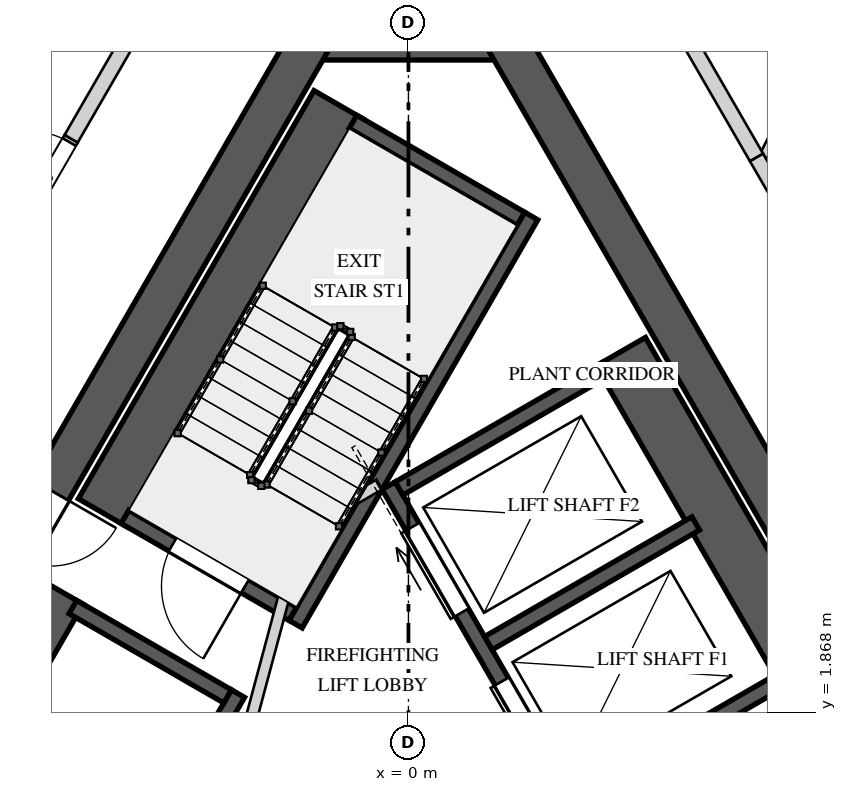
"""IFC4 building model, lengths in metres.
Left out: names, types, materials, properties, quantities, classifications, styles, units other than length and angle.
Written with IfcOpenShell. Run it as: python <this file> out.ifc"""

import sys

from ifc_helpers import new_model, si_unit, direction, frame, frame_2d, origin, place, context, subcontext, project, spatial, polyline, rectangle, outline, extrude, element, fill, save


model = new_model("IFC4")
c1 = context("Model", 3, precision=1e-05, world=origin(), true_north=direction((0.0, 1.0)))
c2 = subcontext(c1, "Body", "Model", "MODEL_VIEW")
j1 = project(units=[si_unit("LENGTHUNIT", "METRE"), si_unit("PLANEANGLEUNIT", "RADIAN")], contexts=[c1])
p1 = place(None, origin())
s1 = spatial("IfcSite", under=j1, at=p1, CompositionType="ELEMENT")
p2 = place(p1, origin())
s2 = spatial("IfcBuilding", under=s1, at=p2, CompositionType="ELEMENT")
p3 = place(p2, frame((0.0, 0.0, 374.9)))
s3 = spatial("IfcBuildingStorey", under=s2, at=p3, CompositionType="ELEMENT", Elevation=374.9)
p4 = place(p3, frame((1.443, 10.725, 0.0), z_axis=(0.0, 0.0, 1.0), x_axis=(-1.0, 0.0, 0.0)))
e1 = element("IfcWall", 1, at=p4, inside=s3, PredefinedType="SHEAR", context=c2, shape_type="SweptSolid", body=[
    extrude(rectangle(XDim=2.887, YDim=0.55, at=frame_2d((1.443, 0.0))), origin(), (0.0, 0.0, 1.0), 6.0),
])
p5 = place(p3, frame((-1.285, 10.725, 0.0), z_axis=(0.0, 0.0, 1.0), x_axis=(-0.499994590896, -0.86602852671, 0.0)))
e2 = element("IfcWall", 2, at=p5, inside=s3, PredefinedType="SHEAR", context=c2, shape_type="SweptSolid", body=[
    extrude(rectangle(XDim=17.292, YDim=0.55, at=frame_2d((8.646, 0.0))), origin(), (0.0, 0.0, 1.0), 6.0),
])
p6 = place(p5, frame((6.851, 0.0, 0.0)))
e3 = element("IfcOpeningElement", 3, at=p6, cuts=e2, PredefinedType="OPENING", context=c2, shape_type="SweptSolid", body=[
    extrude(rectangle(XDim=1.0, YDim=2.4, at=frame_2d((0.5, 1.2))), frame((0.0, 0.285, 0.0), z_axis=(0.0, -1.0, 0.0), x_axis=(1.0, 0.0, 0.0)), (0.0, 0.0, 1.0), 0.57),
])
p7 = place(p5, frame((15.089, 0.0, 0.0)))
e4 = element("IfcOpeningElement", 4, at=p7, cuts=e2, PredefinedType="OPENING", context=c2, shape_type="SweptSolid", body=[
    extrude(rectangle(XDim=0.8, YDim=2.1, at=frame_2d((0.4, 1.05))), frame((0.0, 0.285, 0.0), z_axis=(0.0, -1.0, 0.0), x_axis=(1.0, 0.0, 0.0)), (0.0, 0.0, 1.0), 0.57),
])
p8 = place(p3, frame((9.93, -4.25, 0.0), z_axis=(0.0, 0.0, 1.0), x_axis=(-0.499994590896, 0.86602852671, 0.0)))
e5 = element("IfcWall", 5, at=p8, inside=s3, PredefinedType="SHEAR", context=c2, shape_type="SweptSolid", body=[
    extrude(rectangle(XDim=17.292, YDim=0.55, at=frame_2d((8.646, 0.0))), origin(), (0.0, 0.0, 1.0), 6.0),
])
p9 = place(p8, frame((6.921, 0.0, 0.0)))
e6 = element("IfcOpeningElement", 6, at=p9, cuts=e5, PredefinedType="OPENING", context=c2, shape_type="SweptSolid", body=[
    extrude(rectangle(XDim=1.0, YDim=2.4, at=frame_2d((0.5, 1.2))), frame((0.0, 0.285, 0.0), z_axis=(0.0, -1.0, 0.0), x_axis=(1.0, 0.0, 0.0)), (0.0, 0.0, 1.0), 0.57),
])
p10 = place(p3, frame((-0.918, 9.86, 0.0), z_axis=(0.0, 0.0, 1.0), x_axis=(-0.500026960575, -0.86600983753, 0.0)))
e7 = element("IfcWall", 7, at=p10, inside=s3, PredefinedType="SOLIDWALL", context=c2, shape_type="SweptSolid", body=[
    extrude(rectangle(XDim=6.2, YDim=0.75, at=frame_2d((3.1, 0.0))), origin(), (0.0, 0.0, 1.0), 5.65),
])
p11 = place(p3, frame((1.615, 8.397, 0.0), z_axis=(0.0, 0.0, 1.0), x_axis=(-0.500009909098, -0.866019682689, 0.0)))
e8 = element("IfcWall", 8, at=p11, inside=s3, PredefinedType="SOLIDWALL", context=c2, shape_type="SweptSolid", body=[
    extrude(rectangle(XDim=6.2, YDim=0.2, at=frame_2d((3.1, 0.0))), origin(), (0.0, 0.0, 1.0), 5.65),
])
p12 = place(p3, frame((1.479, 8.361, 0.0), z_axis=(0.0, 0.0, 1.0), x_axis=(-0.865989465428, 0.500062241894, 0.0)))
e9 = element("IfcWall", 9, at=p12, inside=s3, PredefinedType="SOLIDWALL", context=c2, shape_type="SweptSolid", body=[
    extrude(rectangle(XDim=2.55, YDim=0.2, at=frame_2d((1.275, 0.0))), origin(), (0.0, 0.0, 1.0), 5.65),
])
p13 = place(p3, frame((-1.521, 3.165, 0.0), z_axis=(0.0, 0.0, 1.0), x_axis=(-0.866030925526, 0.499990435942, 0.0)))
e10 = element("IfcWall", 10, at=p13, inside=s3, PredefinedType="SOLIDWALL", context=c2, shape_type="SweptSolid", body=[
    extrude(rectangle(XDim=2.55, YDim=0.2, at=frame_2d((1.275, 0.0))), origin(), (0.0, 0.0, 1.0), 5.65),
])
p14 = place(p13, frame((0.725, 0.0, 0.0)))
e11 = element("IfcOpeningElement", 11, at=p14, cuts=e10, PredefinedType="OPENING", context=c2, shape_type="SweptSolid", body=[
    extrude(rectangle(XDim=1.1, YDim=2.4, at=frame_2d((0.55, 1.2))), frame((0.0, 0.11, 0.0), z_axis=(0.0, -1.0, 0.0), x_axis=(1.0, 0.0, 0.0)), (0.0, 0.0, 1.0), 0.22),
])
p15 = place(p3, frame((-4.993, -2.648, 0.0), z_axis=(0.0, 0.0, 1.0), x_axis=(0.499996545922, 0.866027397988, 0.0)))
e12 = element("IfcWall", 12, at=p15, inside=s3, PredefinedType="SOLIDWALL", context=c2, shape_type="SweptSolid", body=[
    extrude(rectangle(XDim=5.5, YDim=0.2, at=frame_2d((2.75, 0.0))), origin(), (0.0, 0.0, 1.0), 5.65),
])
p16 = place(p15, frame((2.275, 0.0, 0.0)))
e13 = element("IfcOpeningElement", 13, at=p16, cuts=e12, PredefinedType="OPENING", context=c2, shape_type="SweptSolid", body=[
    extrude(rectangle(XDim=0.95, YDim=2.4, at=frame_2d((0.475, 1.2))), frame((0.0, 0.11, 0.0), z_axis=(0.0, -1.0, 0.0), x_axis=(1.0, 0.0, 0.0)), (0.0, 0.0, 1.0), 0.22),
])
p17 = place(p3, frame((-4.603, 3.477, 0.0), z_axis=(0.0, 0.0, 1.0), x_axis=(-0.500015767406, -0.866016300277, 0.0)))
e14 = element("IfcWall", 14, at=p17, inside=s3, PredefinedType="SOLIDWALL", context=c2, shape_type="SweptSolid", body=[
    extrude(rectangle(XDim=5.5, YDim=0.75, at=frame_2d((2.75, 0.0))), origin(), (0.0, 0.0, 1.0), 5.65),
])
p18 = place(p3, frame((-2.38, 2.078, 0.0), z_axis=(0.0, 0.0, 1.0), x_axis=(-0.866061024631, 0.499938297808, 0.0)))
e15 = element("IfcWall", 15, at=p18, inside=s3, PredefinedType="SOLIDWALL", context=c2, shape_type="SweptSolid", body=[
    extrude(rectangle(XDim=2.35, YDim=0.2, at=frame_2d((1.175, 0.0))), origin(), (0.0, 0.0, 1.0), 5.65),
])
p19 = place(p3, frame((2.19, 0.606, 0.0), z_axis=(0.0, 0.0, 1.0), x_axis=(-0.500002801628, 0.866023786258, 0.0)))
e16 = element("IfcWall", 16, at=p19, inside=s3, PredefinedType="SOLIDWALL", context=c2, shape_type="SweptSolid", body=[
    extrude(rectangle(XDim=4.9, YDim=0.2, at=frame_2d((2.45, 0.0))), origin(), (0.0, 0.0, 1.0), 5.65),
])
p20 = place(p19, frame((0.625, 0.0, 0.0)))
e17 = element("IfcOpeningElement", 17, at=p20, cuts=e16, PredefinedType="OPENING", context=c2, shape_type="SweptSolid", body=[
    extrude(rectangle(XDim=1.3, YDim=2.1, at=frame_2d((0.65, 1.05))), frame((0.0, 0.11, 0.0), z_axis=(0.0, -1.0, 0.0), x_axis=(1.0, 0.0, 0.0)), (0.0, 0.0, 1.0), 0.22),
])
p21 = place(p19, frame((2.975, 0.0, 0.0)))
e18 = element("IfcOpeningElement", 18, at=p21, cuts=e16, PredefinedType="OPENING", context=c2, shape_type="SweptSolid", body=[
    extrude(rectangle(XDim=1.3, YDim=2.1, at=frame_2d((0.65, 1.05))), frame((0.0, 0.11, 0.0), z_axis=(0.0, -1.0, 0.0), x_axis=(1.0, 0.0, 0.0)), (0.0, 0.0, 1.0), 0.22),
])
p22 = place(p3, frame((5.243, 2.369, 0.0), z_axis=(0.0, 0.0, 1.0), x_axis=(-0.500002801628, 0.866023786258, 0.0)))
e19 = element("IfcWall", 19, at=p22, inside=s3, PredefinedType="SOLIDWALL", context=c2, shape_type="SweptSolid", body=[
    extrude(rectangle(XDim=4.9, YDim=0.75, at=frame_2d((2.45, 0.0))), origin(), (0.0, 0.0, 1.0), 5.65),
])
for number, where, z_axis, x_axis in (
    (20, (2.227, 0.743, 0.0), (0.0, 0.0, 1.0), (0.866, 0.5, 0.0)),
    (21, (1.052, 2.778, 0.0), (0.0, 0.0, 1.0), (0.866, 0.5, 0.0)),
    (22, (-0.123, 4.813, 0.0), (0.0, 0.0, 1.0), (0.866, 0.5, 0.0)),
):
    element("IfcWall", number, at=place(p3, frame(where, z_axis=z_axis, x_axis=x_axis)), inside=s3, PredefinedType="SOLIDWALL", context=c2, shape_type="SweptSolid", body=[
        extrude(rectangle(XDim=3.15, YDim=0.2, at=frame_2d((1.575, 0.0))), origin(), (0.0, 0.0, 1.0), 5.65),
    ])
p23 = place(p3, frame((-2.178, 1.372, 0.0), z_axis=(0.0, 0.0, 1.0), x_axis=(0.258808958833, 0.96592852884, 0.0)))
e23 = element("IfcWall", 23, at=p23, inside=s3, PredefinedType="PARTITIONING", context=c2, shape_type="SweptSolid", body=[
    extrude(rectangle(XDim=2.903, YDim=0.15, at=frame_2d((1.451, 0.0))), origin(), (0.0, 0.0, 1.0), 5.65),
])
p24 = place(p3, frame((-1.51, 4.215, 0.0), z_axis=(0.0, 0.0, 1.0), x_axis=(0.866085525409, 0.49989585183, 0.0)))
e24 = element("IfcWall", 24, at=p24, inside=s3, PredefinedType="PARTITIONING", context=c2, shape_type="SweptSolid", body=[
    extrude(rectangle(XDim=1.3, YDim=0.15, at=frame_2d((0.65, 0.0))), origin(), (0.0, 0.0, 1.0), 5.65),
])
p25 = place(p3, frame((6.241, 12.214, 0.0), z_axis=(0.0, 0.0, 1.0), x_axis=(-0.455016426367, -0.890483044047, 0.0)))
e25 = element("IfcWall", 25, at=p25, inside=s3, PredefinedType="PARTITIONING", context=c2, shape_type="SweptSolid", body=[
    extrude(rectangle(XDim=3.409, YDim=0.15, at=frame_2d((1.705, 0.0))), origin(), (0.0, 0.0, 1.0), 4.95),
])
p26 = place(p3, frame((-5.037, 8.375, 0.0), z_axis=(0.0, 0.0, 1.0), x_axis=(0.50012165622, 0.865955154139, 0.0)))
e26 = element("IfcWall", 26, at=p26, inside=s3, PredefinedType="SOLIDWALL", context=c2, shape_type="SweptSolid", body=[
    extrude(outline(polyline([(0.0, 0.0), (1.2, 0.0), (1.2, 5.65), (1.044, 5.65), (1.044, 4.95), (0.217, 4.95), (0.217, 5.65), (0.0, 5.65), (0.0, 0.0)])), frame((0.0, 0.1, 0.0), z_axis=(0.0, -1.0, 0.0), x_axis=(1.0, 0.0, 0.0)), (0.0, 0.0, 1.0), 0.2),
])
p27 = place(p26, frame((0.05, 0.0, 0.0)))
e27 = element("IfcOpeningElement", 27, at=p27, cuts=e26, PredefinedType="OPENING", context=c2, shape_type="SweptSolid", body=[
    extrude(rectangle(XDim=1.1, YDim=2.4, at=frame_2d((0.55, 1.2))), frame((0.0, 0.11, 0.0), z_axis=(0.0, -1.0, 0.0), x_axis=(1.0, 0.0, 0.0)), (0.0, 0.0, 1.0), 0.22),
])
p28 = place(p3, frame((-4.437, 9.414, 0.0), z_axis=(0.0, 0.0, 1.0), x_axis=(0.499967516757, 0.866044157181, 0.0)))
e28 = element("IfcWall", 28, at=p28, inside=s3, PredefinedType="SOLIDWALL", context=c2, shape_type="SweptSolid", body=[
    extrude(rectangle(XDim=3.909, YDim=0.2, at=frame_2d((1.955, 0.0))), origin(), (0.0, 0.0, 1.0), 5.65),
])
p29 = place(p3, frame((2.483, 12.8, 0.0), z_axis=(0.0, 0.0, 1.0), x_axis=(0.499982771656, -0.866035350345, 0.0)))
e29 = element("IfcWall", 29, at=p29, inside=s3, PredefinedType="SOLIDWALL", context=c2, shape_type="SweptSolid", body=[
    extrude(rectangle(XDim=4.195, YDim=0.2, at=frame_2d((2.097, 0.0))), origin(), (0.0, 0.0, 1.0), 5.65),
])
p30 = place(p3, frame((4.58, 9.167, 0.0), z_axis=(0.0, 0.0, 1.0), x_axis=(0.499945576647, -0.866056822842, 0.0)))
e30 = element("IfcWall", 30, at=p30, inside=s3, PredefinedType="SOLIDWALL", context=c2, shape_type="SweptSolid", body=[
    extrude(rectangle(XDim=0.821, YDim=0.2, at=frame_2d((0.41, 0.0))), origin(), (0.0, 0.0, 1.0), 4.95),
])
p31 = place(p14, origin())
e31 = element("IfcDoor", 31, at=p31, inside=s3, OperationType="SINGLE_SWING_RIGHT", PredefinedType="DOOR", context=c2, shape_type="SweptSolid", body=[
    extrude(rectangle(XDim=1.1, YDim=2.4, at=frame_2d((0.55, 1.2))), frame((0.0, 0.025, 0.0), z_axis=(0.0, -1.0, 0.0), x_axis=(1.0, 0.0, 0.0)), (0.0, 0.0, 1.0), 0.05),
])
fill(e11, e31)
p32 = place(p20, origin())
e32 = element("IfcDoor", 32, at=p32, inside=s3, OperationType="SLIDING_TO_LEFT", PredefinedType="DOOR", context=c2, shape_type="SweptSolid", body=[
    extrude(rectangle(XDim=1.3, YDim=2.1, at=frame_2d((0.65, 1.05))), frame((0.0, 0.025, 0.0), z_axis=(0.0, -1.0, 0.0), x_axis=(1.0, 0.0, 0.0)), (0.0, 0.0, 1.0), 0.05),
])
fill(e17, e32)
p33 = place(p21, origin())
e33 = element("IfcDoor", 33, at=p33, inside=s3, OperationType="SLIDING_TO_RIGHT", PredefinedType="DOOR", context=c2, shape_type="SweptSolid", body=[
    extrude(rectangle(XDim=1.3, YDim=2.1, at=frame_2d((0.65, 1.05))), frame((0.0, 0.025, 0.0), z_axis=(0.0, -1.0, 0.0), x_axis=(1.0, 0.0, 0.0)), (0.0, 0.0, 1.0), 0.05),
])
fill(e18, e33)
p34 = place(p27, origin())
e34 = element("IfcDoor", 34, at=p34, inside=s3, OperationType="SINGLE_SWING_RIGHT", PredefinedType="DOOR", context=c2, shape_type="SweptSolid", body=[
    extrude(rectangle(XDim=1.1, YDim=2.4, at=frame_2d((0.55, 1.2))), frame((0.0, 0.025, 0.0), z_axis=(0.0, -1.0, 0.0), x_axis=(1.0, 0.0, 0.0)), (0.0, 0.0, 1.0), 0.05),
])
fill(e27, e34)
save(model, sys.argv[1])
